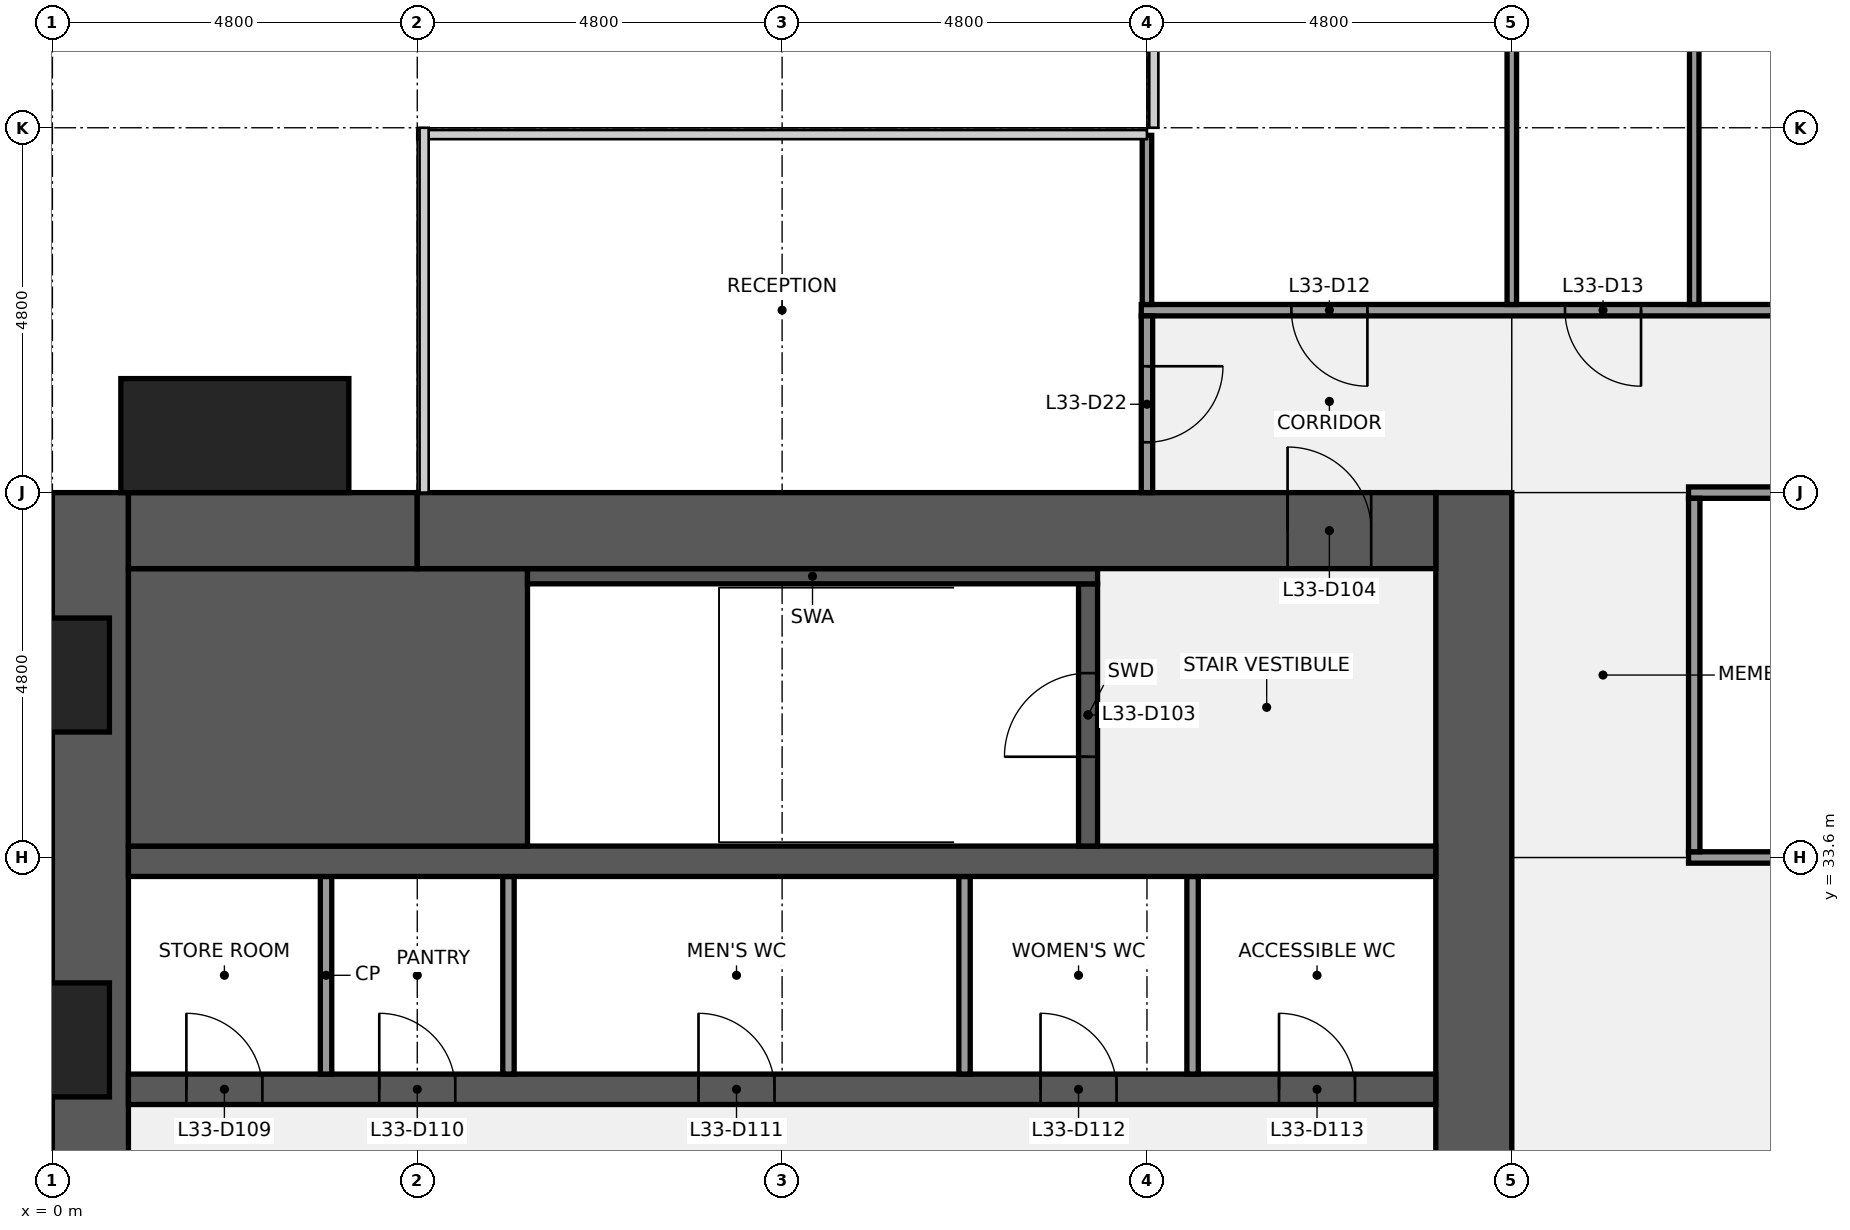
"""IFC4 building model, lengths in metres.
Left out: names, types, materials, properties, quantities, classifications, styles, units other than length and angle.
Written with IfcOpenShell. Run it as: python <this file> out.ifc"""

import sys

from ifc_helpers import new_model, si_unit, direction, frame, frame_2d, origin, origin_2d, place, context, subcontext, project, spatial, rectangle, extrude, element, fill, save


model = new_model("IFC4")
c1 = context("Model", 3, precision=1e-05, world=origin(), true_north=direction((0.0, 1.0)))
c2 = subcontext(c1, "Body", "Model", "MODEL_VIEW")
j1 = project(units=[si_unit("LENGTHUNIT", "METRE"), si_unit("PLANEANGLEUNIT", "RADIAN")], contexts=[c1])
p1 = place(None, origin())
s1 = spatial("IfcSite", under=j1, at=p1, CompositionType="ELEMENT")
p2 = place(p1, origin())
s2 = spatial("IfcBuilding", under=s1, at=p2, CompositionType="ELEMENT")
p3 = place(p2, frame((0.0, 0.0, 152.1)))
s3 = spatial("IfcBuildingStorey", under=s2, at=p3, CompositionType="ELEMENT", Elevation=152.1)
p4 = place(p3, frame((0.5, 9.6, 0.0), z_axis=(0.0, 0.0, 1.0), x_axis=(0.0, 1.0, 0.0)))
e1 = element("IfcWall", 1, at=p4, inside=s3, PredefinedType="SHEAR", context=c2, shape_type="SweptSolid", body=[
    extrude(rectangle(XDim=28.8, YDim=1.0, at=frame_2d((14.4, 0.0))), origin(), (0.0, 0.0, 1.0), 3.84),
])
p5 = place(p4, frame((8.85, 0.0, 0.9)))
e2 = element("IfcOpeningElement", 2, at=p5, cuts=e1, PredefinedType="OPENING", context=c2, shape_type="SweptSolid", body=[
    extrude(rectangle(XDim=1.5, YDim=1.5, at=frame_2d((0.75, 0.75))), frame((0.0, 0.51, 0.0), z_axis=(0.0, -1.0, 0.0), x_axis=(1.0, 0.0, 0.0)), (0.0, 0.0, 1.0), 1.02),
])
p6 = place(p4, frame((18.45, 0.0, 0.9)))
e3 = element("IfcOpeningElement", 3, at=p6, cuts=e1, PredefinedType="OPENING", context=c2, shape_type="SweptSolid", body=[
    extrude(rectangle(XDim=1.5, YDim=1.5, at=frame_2d((0.75, 0.75))), frame((0.0, 0.51, 0.0), z_axis=(0.0, -1.0, 0.0), x_axis=(1.0, 0.0, 0.0)), (0.0, 0.0, 1.0), 1.02),
])
p7 = place(p3, frame((18.7, 38.4, 0.0), z_axis=(0.0, 0.0, 1.0), x_axis=(0.0, -1.0, 0.0)))
e4 = element("IfcWall", 4, at=p7, inside=s3, PredefinedType="SHEAR", context=c2, shape_type="SweptSolid", body=[
    extrude(rectangle(XDim=28.8, YDim=1.0, at=frame_2d((14.4, 0.0))), origin(), (0.0, 0.0, 1.0), 3.84),
])
p8 = place(p7, frame((18.3, 0.0, 0.0)))
e5 = element("IfcOpeningElement", 5, at=p8, cuts=e4, PredefinedType="OPENING", context=c2, shape_type="SweptSolid", body=[
    extrude(rectangle(XDim=1.8, YDim=2.1, at=frame_2d((0.9, 1.05))), frame((0.0, 0.51, 0.0), z_axis=(0.0, -1.0, 0.0), x_axis=(1.0, 0.0, 0.0)), (0.0, 0.0, 1.0), 1.02),
])
p9 = place(p7, frame((8.7, 0.0, 0.0)))
e6 = element("IfcOpeningElement", 6, at=p9, cuts=e4, PredefinedType="OPENING", context=c2, shape_type="SweptSolid", body=[
    extrude(rectangle(XDim=1.8, YDim=2.1, at=frame_2d((0.9, 1.05))), frame((0.0, 0.51, 0.0), z_axis=(0.0, -1.0, 0.0), x_axis=(1.0, 0.0, 0.0)), (0.0, 0.0, 1.0), 1.02),
])
p10 = place(p3, frame((1.0, 30.55, 0.0), z_axis=(0.0, 0.0, 1.0), x_axis=(1.0, 0.0, 0.0)))
e7 = element("IfcWall", 7, at=p10, inside=s3, PredefinedType="SHEAR", context=c2, shape_type="SweptSolid", body=[
    extrude(rectangle(XDim=17.2, YDim=0.4, at=frame_2d((8.6, 0.0))), origin(), (0.0, 0.0, 1.0), 3.84),
])
p11 = place(p10, frame((0.762, 0.0, 0.0)))
e8 = element("IfcOpeningElement", 8, at=p11, cuts=e7, PredefinedType="OPENING", context=c2, shape_type="SweptSolid", body=[
    extrude(rectangle(XDim=1.0, YDim=2.1, at=frame_2d((0.5, 1.05))), frame((0.0, 0.21, 0.0), z_axis=(0.0, -1.0, 0.0), x_axis=(1.0, 0.0, 0.0)), (0.0, 0.0, 1.0), 0.42),
])
p12 = place(p10, frame((3.3, 0.0, 0.0)))
e9 = element("IfcOpeningElement", 9, at=p12, cuts=e7, PredefinedType="OPENING", context=c2, shape_type="SweptSolid", body=[
    extrude(rectangle(XDim=1.0, YDim=2.1, at=frame_2d((0.5, 1.05))), frame((0.0, 0.21, 0.0), z_axis=(0.0, -1.0, 0.0), x_axis=(1.0, 0.0, 0.0)), (0.0, 0.0, 1.0), 0.42),
])
p13 = place(p10, frame((7.5, 0.0, 0.0)))
e10 = element("IfcOpeningElement", 10, at=p13, cuts=e7, PredefinedType="OPENING", context=c2, shape_type="SweptSolid", body=[
    extrude(rectangle(XDim=1.0, YDim=2.1, at=frame_2d((0.5, 1.05))), frame((0.0, 0.21, 0.0), z_axis=(0.0, -1.0, 0.0), x_axis=(1.0, 0.0, 0.0)), (0.0, 0.0, 1.0), 0.42),
])
p14 = place(p10, frame((12.0, 0.0, 0.0)))
e11 = element("IfcOpeningElement", 11, at=p14, cuts=e7, PredefinedType="OPENING", context=c2, shape_type="SweptSolid", body=[
    extrude(rectangle(XDim=1.0, YDim=2.1, at=frame_2d((0.5, 1.05))), frame((0.0, 0.21, 0.0), z_axis=(0.0, -1.0, 0.0), x_axis=(1.0, 0.0, 0.0)), (0.0, 0.0, 1.0), 0.42),
])
p15 = place(p10, frame((15.137, 0.0, 0.0)))
e12 = element("IfcOpeningElement", 12, at=p15, cuts=e7, PredefinedType="OPENING", context=c2, shape_type="SweptSolid", body=[
    extrude(rectangle(XDim=1.0, YDim=2.1, at=frame_2d((0.5, 1.05))), frame((0.0, 0.21, 0.0), z_axis=(0.0, -1.0, 0.0), x_axis=(1.0, 0.0, 0.0)), (0.0, 0.0, 1.0), 0.42),
])
for number, where, z_axis, x_axis in (
    (13, (3.6, 30.75, 0.0), (0.0, 0.0, 1.0), (0.0, 1.0, 0.0)),
    (14, (6.0, 30.75, 0.0), (0.0, 0.0, 1.0), (0.0, 1.0, 0.0)),
    (15, (12.0, 30.75, 0.0), (0.0, 0.0, 1.0), (0.0, 1.0, 0.0)),
    (16, (15.0, 30.75, 0.0), (0.0, 0.0, 1.0), (0.0, 1.0, 0.0)),
):
    element("IfcWall", number, at=place(p3, frame(where, z_axis=z_axis, x_axis=x_axis)), inside=s3, PredefinedType="PARTITIONING", context=c2, shape_type="SweptSolid", body=[
        extrude(rectangle(XDim=2.6, YDim=0.15, at=frame_2d((1.3, 0.0))), origin(), (0.0, 0.0, 1.0), 3.84),
    ])
p16 = place(p3, frame((1.0, 33.55, 0.0), z_axis=(0.0, 0.0, 1.0), x_axis=(1.0, 0.0, 0.0)))
e17 = element("IfcWall", 17, at=p16, inside=s3, PredefinedType="SHEAR", context=c2, shape_type="SweptSolid", body=[
    extrude(rectangle(XDim=17.2, YDim=0.4, at=frame_2d((8.6, 0.0))), origin(), (0.0, 0.0, 1.0), 3.84),
])
p17 = place(p3, frame((1.0, 35.575, 0.0), z_axis=(0.0, 0.0, 1.0), x_axis=(1.0, 0.0, 0.0)))
e18 = element("IfcWall", 18, at=p17, inside=s3, PredefinedType="SHEAR", context=c2, shape_type="SweptSolid", body=[
    extrude(rectangle(XDim=5.25, YDim=3.65, at=frame_2d((2.625, 0.0))), origin(), (0.0, 0.0, 1.0), 3.84),
])
p18 = place(p3, frame((13.625, 33.75, 0.0), z_axis=(0.0, 0.0, 1.0), x_axis=(0.0, 1.0, 0.0)))
e19 = element("IfcWall", 19, at=p18, inside=s3, PredefinedType="SHEAR", context=c2, shape_type="SweptSolid", body=[
    extrude(rectangle(XDim=3.45, YDim=0.25, at=frame_2d((1.725, 0.0))), origin(), (0.0, 0.0, 1.0), 3.84),
])
p19 = place(p18, frame((1.175, 0.0, 0.0)))
e20 = element("IfcOpeningElement", 20, at=p19, cuts=e19, PredefinedType="OPENING", context=c2, shape_type="SweptSolid", body=[
    extrude(rectangle(XDim=1.1, YDim=2.1, at=frame_2d((0.55, 1.05))), frame((0.0, 0.135, 0.0), z_axis=(0.0, -1.0, 0.0), x_axis=(1.0, 0.0, 0.0)), (0.0, 0.0, 1.0), 0.27),
])
p20 = place(p3, frame((6.25, 37.3, 0.0), z_axis=(0.0, 0.0, 1.0), x_axis=(1.0, 0.0, 0.0)))
e21 = element("IfcWall", 21, at=p20, inside=s3, PredefinedType="SHEAR", context=c2, shape_type="SweptSolid", body=[
    extrude(rectangle(XDim=7.5, YDim=0.2, at=frame_2d((3.75, 0.0))), origin(), (0.0, 0.0, 1.0), 3.84),
])
p21 = place(p3, frame((1.0, 37.9, 0.0), z_axis=(0.0, 0.0, 1.0), x_axis=(1.0, 0.0, 0.0)))
e22 = element("IfcWall", 22, at=p21, inside=s3, PredefinedType="SHEAR", context=c2, shape_type="SweptSolid", body=[
    extrude(rectangle(XDim=3.8, YDim=1.0, at=frame_2d((1.9, 0.0))), origin(), (0.0, 0.0, 1.0), 3.84),
])
p22 = place(p3, frame((4.8, 37.9, 0.0), z_axis=(0.0, 0.0, 1.0), x_axis=(1.0, 0.0, 0.0)))
e23 = element("IfcWall", 23, at=p22, inside=s3, PredefinedType="SHEAR", context=c2, shape_type="SweptSolid", body=[
    extrude(rectangle(XDim=13.4, YDim=1.0, at=frame_2d((6.7, 0.0))), origin(), (0.0, 0.0, 1.0), 3.84),
])
p23 = place(p22, frame((11.45, 0.0, 0.0)))
e24 = element("IfcOpeningElement", 24, at=p23, cuts=e23, PredefinedType="OPENING", context=c2, shape_type="SweptSolid", body=[
    extrude(rectangle(XDim=1.1, YDim=2.1, at=frame_2d((0.55, 1.05))), frame((0.0, 0.51, 0.0), z_axis=(0.0, -1.0, 0.0), x_axis=(1.0, 0.0, 0.0)), (0.0, 0.0, 1.0), 1.02),
])
p24 = place(p3, frame((21.525, 33.6, 0.0), z_axis=(0.0, 0.0, 1.0), x_axis=(1.0, 0.0, 0.0)))
e25 = element("IfcWall", 25, at=p24, inside=s3, PredefinedType="PARTITIONING", context=c2, shape_type="SweptSolid", body=[
    extrude(rectangle(XDim=4.95, YDim=0.15, at=frame_2d((2.475, 0.0))), origin(), (0.0, 0.0, 1.0), 2.936),
])
p25 = place(p3, frame((21.525, 38.4, 0.0), z_axis=(0.0, 0.0, 1.0), x_axis=(1.0, 0.0, 0.0)))
e26 = element("IfcWall", 26, at=p25, inside=s3, PredefinedType="PARTITIONING", context=c2, shape_type="SweptSolid", body=[
    extrude(rectangle(XDim=14.55, YDim=0.15, at=frame_2d((7.275, 0.0))), origin(), (0.0, 0.0, 1.0), 2.936),
])
p26 = place(p25, frame((3.175, 0.0, 0.0)))
e27 = element("IfcOpeningElement", 27, at=p26, cuts=e26, PredefinedType="OPENING", context=c2, shape_type="SweptSolid", body=[
    extrude(rectangle(XDim=1.0, YDim=2.1, at=frame_2d((0.5, 1.05))), frame((0.0, 0.085, 0.0), z_axis=(0.0, -1.0, 0.0), x_axis=(1.0, 0.0, 0.0)), (0.0, 0.0, 1.0), 0.17),
])
p27 = place(p25, frame((10.375, 0.0, 0.0)))
e28 = element("IfcOpeningElement", 28, at=p27, cuts=e26, PredefinedType="OPENING", context=c2, shape_type="SweptSolid", body=[
    extrude(rectangle(XDim=1.0, YDim=2.1, at=frame_2d((0.5, 1.05))), frame((0.0, 0.085, 0.0), z_axis=(0.0, -1.0, 0.0), x_axis=(1.0, 0.0, 0.0)), (0.0, 0.0, 1.0), 0.17),
])
p28 = place(p3, frame((14.325, 40.8, 0.0), z_axis=(0.0, 0.0, 1.0), x_axis=(1.0, 0.0, 0.0)))
e29 = element("IfcWall", 29, at=p28, inside=s3, PredefinedType="PARTITIONING", context=c2, shape_type="SweptSolid", body=[
    extrude(rectangle(XDim=28.95, YDim=0.15, at=frame_2d((14.475, 0.0))), origin(), (0.0, 0.0, 1.0), 2.936),
])
p29 = place(p28, frame((1.975, 0.0, 0.0)))
e30 = element("IfcOpeningElement", 30, at=p29, cuts=e29, PredefinedType="OPENING", context=c2, shape_type="SweptSolid", body=[
    extrude(rectangle(XDim=1.0, YDim=2.1, at=frame_2d((0.5, 1.05))), frame((0.0, 0.085, 0.0), z_axis=(0.0, -1.0, 0.0), x_axis=(1.0, 0.0, 0.0)), (0.0, 0.0, 1.0), 0.17),
])
p30 = place(p28, frame((5.575, 0.0, 0.0)))
e31 = element("IfcOpeningElement", 31, at=p30, cuts=e29, PredefinedType="OPENING", context=c2, shape_type="SweptSolid", body=[
    extrude(rectangle(XDim=1.0, YDim=2.1, at=frame_2d((0.5, 1.05))), frame((0.0, 0.085, 0.0), z_axis=(0.0, -1.0, 0.0), x_axis=(1.0, 0.0, 0.0)), (0.0, 0.0, 1.0), 0.17),
])
p31 = place(p28, frame((9.175, 0.0, 0.0)))
e32 = element("IfcOpeningElement", 32, at=p31, cuts=e29, PredefinedType="OPENING", context=c2, shape_type="SweptSolid", body=[
    extrude(rectangle(XDim=1.0, YDim=2.1, at=frame_2d((0.5, 1.05))), frame((0.0, 0.085, 0.0), z_axis=(0.0, -1.0, 0.0), x_axis=(1.0, 0.0, 0.0)), (0.0, 0.0, 1.0), 0.17),
])
p32 = place(p28, frame((13.975, 0.0, 0.0)))
e33 = element("IfcOpeningElement", 33, at=p32, cuts=e29, PredefinedType="OPENING", context=c2, shape_type="SweptSolid", body=[
    extrude(rectangle(XDim=1.0, YDim=2.1, at=frame_2d((0.5, 1.05))), frame((0.0, 0.085, 0.0), z_axis=(0.0, -1.0, 0.0), x_axis=(1.0, 0.0, 0.0)), (0.0, 0.0, 1.0), 0.17),
])
p33 = place(p28, frame((19.975, 0.0, 0.0)))
e34 = element("IfcOpeningElement", 34, at=p33, cuts=e29, PredefinedType="OPENING", context=c2, shape_type="SweptSolid", body=[
    extrude(rectangle(XDim=1.0, YDim=2.1, at=frame_2d((0.5, 1.05))), frame((0.0, 0.085, 0.0), z_axis=(0.0, -1.0, 0.0), x_axis=(1.0, 0.0, 0.0)), (0.0, 0.0, 1.0), 0.17),
])
p34 = place(p28, frame((25.975, 0.0, 0.0)))
e35 = element("IfcOpeningElement", 35, at=p34, cuts=e29, PredefinedType="OPENING", context=c2, shape_type="SweptSolid", body=[
    extrude(rectangle(XDim=1.0, YDim=2.1, at=frame_2d((0.5, 1.05))), frame((0.0, 0.085, 0.0), z_axis=(0.0, -1.0, 0.0), x_axis=(1.0, 0.0, 0.0)), (0.0, 0.0, 1.0), 0.17),
])
p35 = place(p3, frame((14.4, 40.875, 0.0), z_axis=(0.0, 0.0, 1.0), x_axis=(0.0, 1.0, 0.0)))
e36 = element("IfcWall", 36, at=p35, inside=s3, PredefinedType="PARTITIONING", context=c2, shape_type="SweptSolid", body=[
    extrude(rectangle(XDim=2.225, YDim=0.125, at=frame_2d((1.113, 0.0))), origin(), (0.0, 0.0, 1.0), 2.936),
])
p36 = place(p3, frame((14.4, 38.4, 0.0), z_axis=(0.0, 0.0, 1.0), x_axis=(0.0, 1.0, 0.0)))
e37 = element("IfcWall", 37, at=p36, inside=s3, PredefinedType="PARTITIONING", context=c2, shape_type="SweptSolid", body=[
    extrude(rectangle(XDim=2.325, YDim=0.15, at=frame_2d((1.163, 0.0))), origin(), (0.0, 0.0, 1.0), 2.936),
])
p37 = place(p36, frame((0.663, 0.0, 0.0)))
e38 = element("IfcOpeningElement", 38, at=p37, cuts=e37, PredefinedType="OPENING", context=c2, shape_type="SweptSolid", body=[
    extrude(rectangle(XDim=1.0, YDim=2.1, at=frame_2d((0.5, 1.05))), frame((0.0, 0.085, 0.0), z_axis=(0.0, -1.0, 0.0), x_axis=(1.0, 0.0, 0.0)), (0.0, 0.0, 1.0), 0.17),
])
p38 = place(p3, frame((19.2, 40.875, 0.0), z_axis=(0.0, 0.0, 1.0), x_axis=(0.0, 1.0, 0.0)))
e39 = element("IfcWall", 39, at=p38, inside=s3, PredefinedType="PARTITIONING", context=c2, shape_type="SweptSolid", body=[
    extrude(rectangle(XDim=6.525, YDim=0.125, at=frame_2d((3.262, 0.0))), origin(), (0.0, 0.0, 1.0), 2.936),
])
p39 = place(p3, frame((21.6, 40.875, 0.0), z_axis=(0.0, 0.0, 1.0), x_axis=(0.0, 1.0, 0.0)))
e40 = element("IfcWall", 40, at=p39, inside=s3, PredefinedType="PARTITIONING", context=c2, shape_type="SweptSolid", body=[
    extrude(rectangle(XDim=7.025, YDim=0.125, at=frame_2d((3.512, 0.0))), origin(), (0.0, 0.0, 1.0), 2.936),
])
p40 = place(p3, frame((21.6, 33.675, 0.0), z_axis=(0.0, 0.0, 1.0), x_axis=(0.0, 1.0, 0.0)))
e41 = element("IfcWall", 41, at=p40, inside=s3, PredefinedType="PARTITIONING", context=c2, shape_type="SweptSolid", body=[
    extrude(rectangle(XDim=4.65, YDim=0.15, at=frame_2d((2.325, 0.0))), origin(), (0.0, 0.0, 1.0), 2.936),
])
p41 = place(p3, frame((2.4, 39.15, 0.0), z_axis=(0.0, 0.0, 1.0), x_axis=(1.0, 0.0, 0.0)))
e42 = element("IfcColumn", 42, at=p41, inside=s3, PredefinedType="PILASTER", context=c2, shape_type="SweptSolid", body=[
    extrude(rectangle(XDim=3.0, YDim=1.5, at=origin_2d()), origin(), (0.0, 0.0, 1.0), 4.0),
])
p42 = place(p19, origin())
e43 = element("IfcDoor", 43, at=p42, inside=s3, OperationType="SINGLE_SWING_LEFT", PredefinedType="DOOR", context=c2, shape_type="SweptSolid", body=[
    extrude(rectangle(XDim=1.1, YDim=2.1, at=frame_2d((0.55, 1.05))), frame((0.0, 0.025, 0.0), z_axis=(0.0, -1.0, 0.0), x_axis=(1.0, 0.0, 0.0)), (0.0, 0.0, 1.0), 0.05),
])
fill(e20, e43)
p43 = place(p23, origin())
e44 = element("IfcDoor", 44, at=p43, inside=s3, OperationType="SINGLE_SWING_LEFT", PredefinedType="DOOR", context=c2, shape_type="SweptSolid", body=[
    extrude(rectangle(XDim=1.1, YDim=2.1, at=frame_2d((0.55, 1.05))), frame((0.0, 0.025, 0.0), z_axis=(0.0, -1.0, 0.0), x_axis=(1.0, 0.0, 0.0)), (0.0, 0.0, 1.0), 0.05),
])
fill(e24, e44)
p44 = place(p11, origin())
e45 = element("IfcDoor", 45, at=p44, inside=s3, OperationType="SINGLE_SWING_LEFT", PredefinedType="DOOR", context=c2, shape_type="SweptSolid", body=[
    extrude(rectangle(XDim=1.0, YDim=2.1, at=frame_2d((0.5, 1.05))), frame((0.0, 0.025, 0.0), z_axis=(0.0, -1.0, 0.0), x_axis=(1.0, 0.0, 0.0)), (0.0, 0.0, 1.0), 0.05),
])
fill(e8, e45)
p45 = place(p12, origin())
e46 = element("IfcDoor", 46, at=p45, inside=s3, OperationType="SINGLE_SWING_LEFT", PredefinedType="DOOR", context=c2, shape_type="SweptSolid", body=[
    extrude(rectangle(XDim=1.0, YDim=2.1, at=frame_2d((0.5, 1.05))), frame((0.0, 0.025, 0.0), z_axis=(0.0, -1.0, 0.0), x_axis=(1.0, 0.0, 0.0)), (0.0, 0.0, 1.0), 0.05),
])
fill(e9, e46)
p46 = place(p13, origin())
e47 = element("IfcDoor", 47, at=p46, inside=s3, OperationType="SINGLE_SWING_LEFT", PredefinedType="DOOR", context=c2, shape_type="SweptSolid", body=[
    extrude(rectangle(XDim=1.0, YDim=2.1, at=frame_2d((0.5, 1.05))), frame((0.0, 0.025, 0.0), z_axis=(0.0, -1.0, 0.0), x_axis=(1.0, 0.0, 0.0)), (0.0, 0.0, 1.0), 0.05),
])
fill(e10, e47)
p47 = place(p14, origin())
e48 = element("IfcDoor", 48, at=p47, inside=s3, OperationType="SINGLE_SWING_LEFT", PredefinedType="DOOR", context=c2, shape_type="SweptSolid", body=[
    extrude(rectangle(XDim=1.0, YDim=2.1, at=frame_2d((0.5, 1.05))), frame((0.0, 0.025, 0.0), z_axis=(0.0, -1.0, 0.0), x_axis=(1.0, 0.0, 0.0)), (0.0, 0.0, 1.0), 0.05),
])
fill(e11, e48)
p48 = place(p15, origin())
e49 = element("IfcDoor", 49, at=p48, inside=s3, OperationType="SINGLE_SWING_LEFT", PredefinedType="DOOR", context=c2, shape_type="SweptSolid", body=[
    extrude(rectangle(XDim=1.0, YDim=2.1, at=frame_2d((0.5, 1.05))), frame((0.0, 0.025, 0.0), z_axis=(0.0, -1.0, 0.0), x_axis=(1.0, 0.0, 0.0)), (0.0, 0.0, 1.0), 0.05),
])
fill(e12, e49)
p49 = place(p29, origin())
e50 = element("IfcDoor", 50, at=p49, inside=s3, OperationType="SINGLE_SWING_RIGHT", PredefinedType="DOOR", context=c2, shape_type="SweptSolid", body=[
    extrude(rectangle(XDim=1.0, YDim=2.1, at=frame_2d((0.5, 1.05))), frame((0.0, 0.025, 0.0), z_axis=(0.0, -1.0, 0.0), x_axis=(1.0, 0.0, 0.0)), (0.0, 0.0, 1.0), 0.05),
])
fill(e30, e50)
p50 = place(p30, origin())
e51 = element("IfcDoor", 51, at=p50, inside=s3, OperationType="SINGLE_SWING_RIGHT", PredefinedType="DOOR", context=c2, shape_type="SweptSolid", body=[
    extrude(rectangle(XDim=1.0, YDim=2.1, at=frame_2d((0.5, 1.05))), frame((0.0, 0.025, 0.0), z_axis=(0.0, -1.0, 0.0), x_axis=(1.0, 0.0, 0.0)), (0.0, 0.0, 1.0), 0.05),
])
fill(e31, e51)
p51 = place(p37, origin())
e52 = element("IfcDoor", 52, at=p51, inside=s3, OperationType="SINGLE_SWING_RIGHT", PredefinedType="DOOR", context=c2, shape_type="SweptSolid", body=[
    extrude(rectangle(XDim=1.0, YDim=2.1, at=frame_2d((0.5, 1.05))), frame((0.0, 0.025, 0.0), z_axis=(0.0, -1.0, 0.0), x_axis=(1.0, 0.0, 0.0)), (0.0, 0.0, 1.0), 0.05),
])
fill(e38, e52)
save(model, sys.argv[1])
